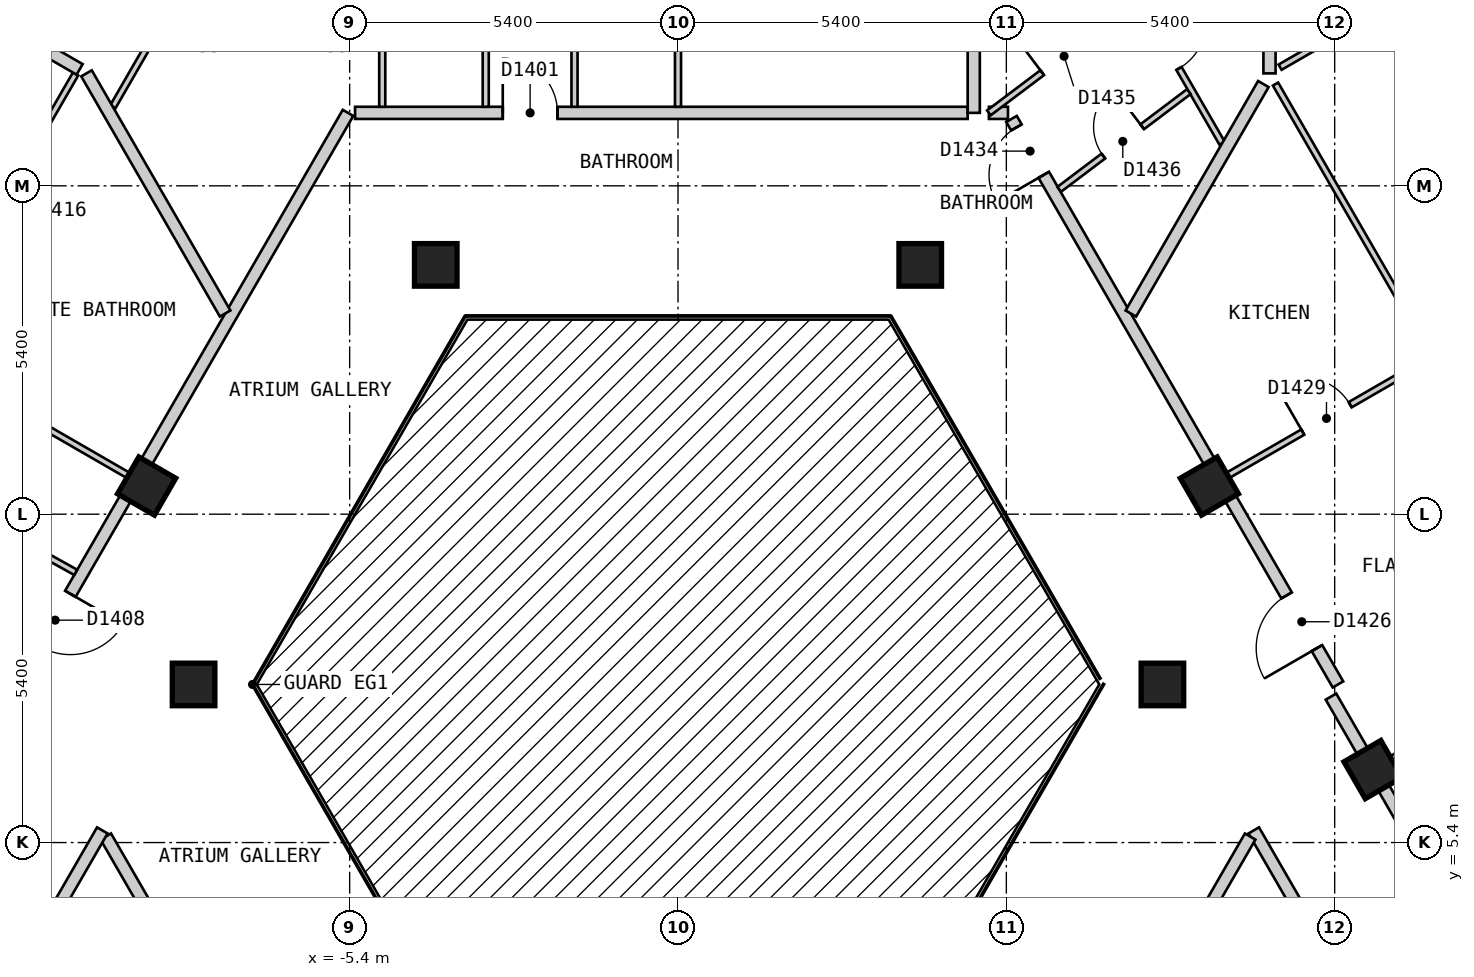
"""IFC4 building model, lengths in metres.
Left out: names, types, materials, properties, quantities, classifications, styles, units other than length and angle.
Written with IfcOpenShell. Run it as: python <this file> out.ifc"""

import sys

from ifc_helpers import new_model, si_unit, direction, frame, frame_2d, origin, origin_2d, place, context, subcontext, project, spatial, rectangle, extrude, element, fill, save


model = new_model("IFC4")
c1 = context("Model", 3, precision=1e-05, world=origin(), true_north=direction((0.0, 1.0)))
c2 = subcontext(c1, "Body", "Model", "MODEL_VIEW")
j1 = project(units=[si_unit("LENGTHUNIT", "METRE"), si_unit("PLANEANGLEUNIT", "RADIAN")], contexts=[c1])
p1 = place(None, origin())
s1 = spatial("IfcSite", under=j1, at=p1, CompositionType="ELEMENT")
p2 = place(p1, origin())
s2 = spatial("IfcBuilding", under=s1, at=p2, CompositionType="ELEMENT")
p3 = place(p2, frame((0.0, 0.0, 166.2)))
s3 = spatial("IfcBuildingStorey", under=s2, at=p3, CompositionType="ELEMENT", Elevation=166.2)
for number, where, z_axis, x_axis in (
    (1, (11.431, 6.6, 0.0), (0.0, 0.0, 1.0), (-0.5, 0.866, 0.0)),
    (2, (7.967, 8.0, 0.0), (0.0, 0.0, 1.0), (1.0, 0.0, 0.0)),
    (3, (8.739, 11.263, 0.0), (0.0, 0.0, 1.0), (-0.5, 0.866, 0.0)),
    (4, (3.984, 14.9, 0.0), (0.0, 0.0, 1.0), (1.0, 0.0, 0.0)),
    (5, (-3.984, 14.9, 0.0), (0.0, 0.0, 1.0), (1.0, 0.0, 0.0)),
    (6, (-8.739, 11.263, 0.0), (0.0, 0.0, 1.0), (-0.5, -0.866, 0.0)),
    (7, (-7.967, 8.0, 0.0), (0.0, 0.0, 1.0), (1.0, 0.0, 0.0)),
):
    element("IfcColumn", number, at=place(p3, frame(where, z_axis=z_axis, x_axis=x_axis)), inside=s3, PredefinedType="COLUMN", context=c2, shape_type="SweptSolid", body=[
        extrude(rectangle(XDim=0.7, YDim=0.7, at=origin_2d()), origin(), (0.0, 0.0, 1.0), 3.0),
    ])
p4 = place(p3, frame((-9.411, 5.5, 0.0), z_axis=(0.0, 0.0, 1.0), x_axis=(0.500018099276, -0.86601495391, 0.0)))
e8 = element("IfcWall", 8, at=p4, inside=s3, PredefinedType="PARTITIONING", context=c2, shape_type="SweptSolid", body=[
    extrude(rectangle(XDim=4.765, YDim=0.2, at=frame_2d((2.383, 0.0))), origin(), (0.0, 0.0, 1.0), 2.7),
])
p5 = place(p3, frame((9.469, 5.6, 0.0), z_axis=(0.0, 0.0, 1.0), x_axis=(0.499964524401, -0.866045884662, 0.0)))
e9 = element("IfcWall", 9, at=p5, inside=s3, PredefinedType="PARTITIONING", context=c2, shape_type="SweptSolid", body=[
    extrude(rectangle(XDim=7.042, YDim=0.2, at=frame_2d((3.521, 0.0))), origin(), (0.0, 0.0, 1.0), 2.7),
])
p6 = place(p5, frame((3.129, 0.0, 0.0)))
e10 = element("IfcOpeningElement", 10, at=p6, cuts=e9, PredefinedType="OPENING", context=c2, shape_type="SweptSolid", body=[
    extrude(rectangle(XDim=0.9, YDim=2.1, at=frame_2d((0.45, 1.05))), frame((0.0, 0.11, 0.0), z_axis=(0.0, -1.0, 0.0), x_axis=(1.0, 0.0, 0.0)), (0.0, 0.0, 1.0), 0.22),
])
p7 = place(p3, frame((10.739, 7.8, 0.0), z_axis=(0.0, 0.0, 1.0), x_axis=(0.499964311759, -0.86604600742, 0.0)))
e11 = element("IfcWall", 11, at=p7, inside=s3, PredefinedType="PARTITIONING", context=c2, shape_type="SweptSolid", body=[
    extrude(rectangle(XDim=9.583, YDim=0.2, at=frame_2d((4.792, 0.0))), origin(), (0.0, 0.0, 1.0), 2.7),
])
p8 = place(p3, frame((5.485, 17.3, 0.0), z_axis=(0.0, 0.0, 1.0), x_axis=(0.499965832213, -0.866045129667, 0.0)))
e12 = element("IfcWall", 12, at=p8, inside=s3, PredefinedType="PARTITIONING", context=c2, shape_type="SweptSolid", body=[
    extrude(rectangle(XDim=10.739, YDim=0.2, at=frame_2d((5.369, 0.0))), origin(), (0.0, 0.0, 1.0), 2.7),
])
p9 = place(p8, frame((9.048, 0.0, 0.0)))
e13 = element("IfcOpeningElement", 13, at=p9, cuts=e12, PredefinedType="OPENING", context=c2, shape_type="SweptSolid", body=[
    extrude(rectangle(XDim=1.0, YDim=2.1, at=frame_2d((0.5, 1.05))), frame((0.0, 0.11, 0.0), z_axis=(0.0, -1.0, 0.0), x_axis=(1.0, 0.0, 0.0)), (0.0, 0.0, 1.0), 0.22),
])
p10 = place(p8, frame((0.161, 0.0, 0.0)))
e14 = element("IfcOpeningElement", 14, at=p10, cuts=e12, PredefinedType="OPENING", context=c2, shape_type="SweptSolid", body=[
    extrude(rectangle(XDim=0.9, YDim=2.1, at=frame_2d((0.45, 1.05))), frame((0.0, 0.11, 0.0), z_axis=(0.0, -1.0, 0.0), x_axis=(1.0, 0.0, 0.0)), (0.0, 0.0, 1.0), 0.22),
])
p11 = place(p3, frame((-5.311, 17.4, 0.0), z_axis=(0.0, 0.0, 1.0), x_axis=(1.0, 0.0, 0.0)))
e15 = element("IfcWall", 15, at=p11, inside=s3, PredefinedType="PARTITIONING", context=c2, shape_type="SweptSolid", body=[
    extrude(rectangle(XDim=10.075, YDim=0.2, at=frame_2d((5.038, 0.0))), origin(), (0.0, 0.0, 1.0), 2.7),
])
p12 = place(p11, frame((2.429, 0.0, 0.0)))
e16 = element("IfcOpeningElement", 16, at=p12, cuts=e15, PredefinedType="OPENING", context=c2, shape_type="SweptSolid", body=[
    extrude(rectangle(XDim=0.9, YDim=2.1, at=frame_2d((0.45, 1.05))), frame((0.0, 0.11, 0.0), z_axis=(0.0, -1.0, 0.0), x_axis=(1.0, 0.0, 0.0)), (0.0, 0.0, 1.0), 0.22),
])
p13 = place(p3, frame((5.113, 17.4, 0.0), z_axis=(0.0, 0.0, 1.0), x_axis=(1.0, 0.0, 0.0)))
e17 = element("IfcWall", 17, at=p13, inside=s3, PredefinedType="PARTITIONING", context=c2, shape_type="SweptSolid", body=[
    extrude(rectangle(XDim=0.314, YDim=0.2, at=frame_2d((0.157, 0.0))), origin(), (0.0, 0.0, 1.0), 2.7),
])
p14 = place(p3, frame((7.028, 1.373, 0.0), z_axis=(0.0, 0.0, 1.0), x_axis=(0.499953126767, 0.866052464367, 0.0)))
e18 = element("IfcWall", 18, at=p14, inside=s3, PredefinedType="PARTITIONING", context=c2, shape_type="SweptSolid", body=[
    extrude(rectangle(XDim=4.764, YDim=0.2, at=frame_2d((2.382, 0.0))), origin(), (0.0, 0.0, 1.0), 2.7),
])
p15 = place(p3, frame((-13.048, -0.601, 0.0), z_axis=(0.0, 0.0, 1.0), x_axis=(0.499982180423, 0.866035691677, 0.0)))
e19 = element("IfcWall", 19, at=p15, inside=s3, PredefinedType="PARTITIONING", context=c2, shape_type="SweptSolid", body=[
    extrude(rectangle(XDim=7.16, YDim=0.2, at=frame_2d((3.58, 0.0))), origin(), (0.0, 0.0, 1.0), 2.7),
])
p16 = place(p15, frame((3.13, 0.0, 0.0)))
e20 = element("IfcOpeningElement", 20, at=p16, cuts=e19, PredefinedType="OPENING", context=c2, shape_type="SweptSolid", body=[
    extrude(rectangle(XDim=0.9, YDim=2.1, at=frame_2d((0.45, 1.05))), frame((0.0, 0.11, 0.0), z_axis=(0.0, -1.0, 0.0), x_axis=(1.0, 0.0, 0.0)), (0.0, 0.0, 1.0), 0.22),
])
p17 = place(p3, frame((-10.854, 8.0, 0.0), z_axis=(0.0, 0.0, 1.0), x_axis=(0.499997637144, 0.866026767976, 0.0)))
e21 = element("IfcWall", 21, at=p17, inside=s3, PredefinedType="PARTITIONING", context=c2, shape_type="SweptSolid", body=[
    extrude(rectangle(XDim=10.854, YDim=0.2, at=frame_2d((5.427, 0.0))), origin(), (0.0, 0.0, 1.0), 2.7),
])
p18 = place(p17, frame((0.721, 0.0, 0.0)))
e22 = element("IfcOpeningElement", 22, at=p18, cuts=e21, PredefinedType="OPENING", context=c2, shape_type="SweptSolid", body=[
    extrude(rectangle(XDim=1.0, YDim=2.1, at=frame_2d((0.5, 1.05))), frame((0.0, 0.11, 0.0), z_axis=(0.0, -1.0, 0.0), x_axis=(1.0, 0.0, 0.0)), (0.0, 0.0, 1.0), 0.22),
])
p19 = place(p3, frame((7.073, 20.15, 0.0), z_axis=(0.0, 0.0, 1.0), x_axis=(0.499917691695, -0.866072919292, 0.0)))
e23 = element("IfcWall", 23, at=p19, inside=s3, PredefinedType="PARTITIONING", context=c2, shape_type="SweptSolid", body=[
    extrude(rectangle(XDim=3.753, YDim=0.1, at=frame_2d((1.876, 0.0))), origin(), (0.0, 0.0, 1.0), 2.7),
])
p20 = place(p19, frame((1.432, 0.0, 0.0)))
e24 = element("IfcOpeningElement", 24, at=p20, cuts=e23, PredefinedType="OPENING", context=c2, shape_type="SweptSolid", body=[
    extrude(rectangle(XDim=0.9, YDim=2.1, at=frame_2d((0.45, 1.05))), frame((0.0, 0.06, 0.0), z_axis=(0.0, -1.0, 0.0), x_axis=(1.0, 0.0, 0.0)), (0.0, 0.0, 1.0), 0.12),
])
p21 = place(p3, frame((9.827, 17.874, 0.0), z_axis=(0.0, 0.0, 1.0), x_axis=(0.499962189394, -0.866047232647, 0.0)))
e25 = element("IfcWall", 25, at=p21, inside=s3, PredefinedType="PARTITIONING", context=c2, shape_type="SweptSolid", body=[
    extrude(rectangle(XDim=11.401, YDim=0.1, at=frame_2d((5.701, 0.0))), origin(), (0.0, 0.0, 1.0), 2.7),
])
p22 = place(p21, frame((7.433, 0.0, 0.0)))
e26 = element("IfcOpeningElement", 26, at=p22, cuts=e25, PredefinedType="OPENING", context=c2, shape_type="SweptSolid", body=[
    extrude(rectangle(XDim=0.9, YDim=2.1, at=frame_2d((0.45, 1.05))), frame((0.0, 0.06, 0.0), z_axis=(0.0, -1.0, 0.0), x_axis=(1.0, 0.0, 0.0)), (0.0, 0.0, 1.0), 0.12),
])
p23 = place(p3, frame((-4.864, 20.769, 0.0), z_axis=(0.0, 0.0, 1.0), x_axis=(0.0, -1.0, 0.0)))
e27 = element("IfcWall", 27, at=p23, inside=s3, PredefinedType="PARTITIONING", context=c2, shape_type="SweptSolid", body=[
    extrude(rectangle(XDim=3.269, YDim=0.1, at=frame_2d((1.635, 0.0))), origin(), (0.0, 0.0, 1.0), 2.7),
])
p24 = place(p3, frame((0.0, 20.43, 0.0), z_axis=(0.0, 0.0, 1.0), x_axis=(0.0, -1.0, 0.0)))
e28 = element("IfcWall", 28, at=p24, inside=s3, PredefinedType="PARTITIONING", context=c2, shape_type="SweptSolid", body=[
    extrude(rectangle(XDim=2.93, YDim=0.1, at=frame_2d((1.465, 0.0))), origin(), (0.0, 0.0, 1.0), 2.7),
])
p25 = place(p3, frame((-13.444, 11.814, 0.0), z_axis=(0.0, 0.0, 1.0), x_axis=(0.873653620945, -0.486548405207, 0.0)))
e29 = element("IfcWall", 29, at=p25, inside=s3, PredefinedType="PARTITIONING", context=c2, shape_type="SweptSolid", body=[
    extrude(rectangle(XDim=4.051, YDim=0.1, at=frame_2d((2.025, 0.0))), origin(), (0.0, 0.0, 1.0), 2.7),
])
p26 = place(p25, frame((1.65, 0.0, 0.0)))
e30 = element("IfcOpeningElement", 30, at=p26, cuts=e29, PredefinedType="OPENING", context=c2, shape_type="SweptSolid", body=[
    extrude(rectangle(XDim=0.8, YDim=2.1, at=frame_2d((0.4, 1.05))), frame((0.0, 0.06, 0.0), z_axis=(0.0, -1.0, 0.0), x_axis=(1.0, 0.0, 0.0)), (0.0, 0.0, 1.0), 0.12),
])
p27 = place(p3, frame((-9.295, 17.5, 0.0), z_axis=(0.0, 0.0, 1.0), x_axis=(0.500060839138, 0.865990275442, 0.0)))
e31 = element("IfcWall", 31, at=p27, inside=s3, PredefinedType="PARTITIONING", context=c2, shape_type="SweptSolid", body=[
    extrude(rectangle(XDim=3.81, YDim=0.1, at=frame_2d((1.905, 0.0))), origin(), (0.0, 0.0, 1.0), 2.7),
])
p28 = place(p27, frame((2.079, 0.0, 0.0)))
e32 = element("IfcOpeningElement", 32, at=p28, cuts=e31, PredefinedType="OPENING", context=c2, shape_type="SweptSolid", body=[
    extrude(rectangle(XDim=0.8, YDim=2.1, at=frame_2d((0.4, 1.05))), frame((0.0, 0.06, 0.0), z_axis=(0.0, -1.0, 0.0), x_axis=(1.0, 0.0, 0.0)), (0.0, 0.0, 1.0), 0.12),
])
p29 = place(p3, frame((-15.704, 8.0, 0.0), z_axis=(0.0, 0.0, 1.0), x_axis=(0.500005637941, 0.866022148693, 0.0)))
e33 = element("IfcWall", 33, at=p29, inside=s3, PredefinedType="PARTITIONING", context=c2, shape_type="SweptSolid", body=[
    extrude(rectangle(XDim=11.592, YDim=0.1, at=frame_2d((5.796, 0.0))), origin(), (0.0, 0.0, 1.0), 2.7),
])
p30 = place(p29, frame((3.132, 0.0, 0.0)))
e34 = element("IfcOpeningElement", 34, at=p30, cuts=e33, PredefinedType="OPENING", context=c2, shape_type="SweptSolid", body=[
    extrude(rectangle(XDim=0.9, YDim=2.1, at=frame_2d((0.45, 1.05))), frame((0.0, 0.06, 0.0), z_axis=(0.0, -1.0, 0.0), x_axis=(1.0, 0.0, 0.0)), (0.0, 0.0, 1.0), 0.12),
])
p31 = place(p29, frame((8.6, 0.0, 0.0)))
e35 = element("IfcOpeningElement", 35, at=p31, cuts=e33, PredefinedType="OPENING", context=c2, shape_type="SweptSolid", body=[
    extrude(rectangle(XDim=0.8, YDim=2.1, at=frame_2d((0.4, 1.05))), frame((0.0, 0.06, 0.0), z_axis=(0.0, -1.0, 0.0), x_axis=(1.0, 0.0, 0.0)), (0.0, 0.0, 1.0), 0.12),
])
p32 = place(p3, frame((-3.162, 17.5, 0.0), z_axis=(0.0, 0.0, 1.0), x_axis=(0.0, 1.0, 0.0)))
e36 = element("IfcWall", 36, at=p32, inside=s3, PredefinedType="PARTITIONING", context=c2, shape_type="SweptSolid", body=[
    extrude(rectangle(XDim=2.959, YDim=0.1, at=frame_2d((1.479, 0.0))), origin(), (0.0, 0.0, 1.0), 2.7),
])
p33 = place(p32, frame((0.98, 0.0, 0.0)))
e37 = element("IfcOpeningElement", 37, at=p33, cuts=e36, PredefinedType="OPENING", context=c2, shape_type="SweptSolid", body=[
    extrude(rectangle(XDim=0.9, YDim=2.1, at=frame_2d((0.45, 1.05))), frame((0.0, 0.06, 0.0), z_axis=(0.0, -1.0, 0.0), x_axis=(1.0, 0.0, 0.0)), (0.0, 0.0, 1.0), 0.12),
])
p34 = place(p3, frame((-1.702, 17.5, 0.0), z_axis=(0.0, 0.0, 1.0), x_axis=(0.0, 1.0, 0.0)))
e38 = element("IfcWall", 38, at=p34, inside=s3, PredefinedType="PARTITIONING", context=c2, shape_type="SweptSolid", body=[
    extrude(rectangle(XDim=2.91, YDim=0.1, at=frame_2d((1.455, 0.0))), origin(), (0.0, 0.0, 1.0), 2.7),
])
p35 = place(p34, frame((1.03, 0.0, 0.0)))
e39 = element("IfcOpeningElement", 39, at=p35, cuts=e38, PredefinedType="OPENING", context=c2, shape_type="SweptSolid", body=[
    extrude(rectangle(XDim=0.8, YDim=2.1, at=frame_2d((0.4, 1.05))), frame((0.0, 0.06, 0.0), z_axis=(0.0, -1.0, 0.0), x_axis=(1.0, 0.0, 0.0)), (0.0, 0.0, 1.0), 0.12),
])
p36 = place(p3, frame((11.518, 6.65, 0.0), z_axis=(0.0, 0.0, 1.0), x_axis=(0.865949381454, 0.500131651427, 0.0)))
e40 = element("IfcWall", 40, at=p36, inside=s3, PredefinedType="PARTITIONING", context=c2, shape_type="SweptSolid", body=[
    extrude(rectangle(XDim=4.097, YDim=0.1, at=frame_2d((2.049, 0.0))), origin(), (0.0, 0.0, 1.0), 2.7),
])
p37 = place(p36, frame((1.623, 0.0, 0.0)))
e41 = element("IfcOpeningElement", 41, at=p37, cuts=e40, PredefinedType="OPENING", context=c2, shape_type="SweptSolid", body=[
    extrude(rectangle(XDim=0.8, YDim=2.1, at=frame_2d((0.4, 1.05))), frame((0.0, 0.06, 0.0), z_axis=(0.0, -1.0, 0.0), x_axis=(1.0, 0.0, 0.0)), (0.0, 0.0, 1.0), 0.12),
])
p38 = place(p3, frame((8.999, 11.413, 0.0), z_axis=(0.0, 0.0, 1.0), x_axis=(0.865969252911, 0.500097243556, 0.0)))
e42 = element("IfcWall", 42, at=p38, inside=s3, PredefinedType="PARTITIONING", context=c2, shape_type="SweptSolid", body=[
    extrude(rectangle(XDim=3.947, YDim=0.1, at=frame_2d((1.974, 0.0))), origin(), (0.0, 0.0, 1.0), 2.7),
])
p39 = place(p38, frame((1.474, 0.0, 0.0)))
e43 = element("IfcOpeningElement", 43, at=p39, cuts=e42, PredefinedType="OPENING", context=c2, shape_type="SweptSolid", body=[
    extrude(rectangle(XDim=0.9, YDim=2.1, at=frame_2d((0.45, 1.05))), frame((0.0, 0.06, 0.0), z_axis=(0.0, -1.0, 0.0), x_axis=(1.0, 0.0, 0.0)), (0.0, 0.0, 1.0), 0.12),
])
p40 = place(p3, frame((9.902, 18.151, 0.0), z_axis=(0.0, 0.0, 1.0), x_axis=(0.866032278734, 0.499988092049, 0.0)))
e44 = element("IfcWall", 44, at=p40, inside=s3, PredefinedType="PARTITIONING", context=c2, shape_type="SweptSolid", body=[
    extrude(rectangle(XDim=5.649, YDim=0.1, at=frame_2d((2.824, 0.0))), origin(), (0.0, 0.0, 1.0), 2.7),
])
p41 = place(p40, frame((2.274, 0.0, 0.0)))
e45 = element("IfcOpeningElement", 45, at=p41, cuts=e44, PredefinedType="OPENING", context=c2, shape_type="SweptSolid", body=[
    extrude(rectangle(XDim=0.9, YDim=2.1, at=frame_2d((0.45, 1.05))), frame((0.0, 0.06, 0.0), z_axis=(0.0, -1.0, 0.0), x_axis=(1.0, 0.0, 0.0)), (0.0, 0.0, 1.0), 0.12),
])
p42 = place(p3, frame((6.269, 16.142, 0.0), z_axis=(0.0, 0.0, 1.0), x_axis=(0.798549086509, 0.601929693931, 0.0)))
e46 = element("IfcWall", 46, at=p42, inside=s3, PredefinedType="PARTITIONING", context=c2, shape_type="SweptSolid", body=[
    extrude(rectangle(XDim=2.67, YDim=0.1, at=frame_2d((1.335, 0.0))), origin(), (0.0, 0.0, 1.0), 2.7),
])
p43 = place(p42, frame((0.91, 0.0, 0.0)))
e47 = element("IfcOpeningElement", 47, at=p43, cuts=e46, PredefinedType="OPENING", context=c2, shape_type="SweptSolid", body=[
    extrude(rectangle(XDim=0.8, YDim=2.1, at=frame_2d((0.4, 1.05))), frame((0.0, 0.06, 0.0), z_axis=(0.0, -1.0, 0.0), x_axis=(1.0, 0.0, 0.0)), (0.0, 0.0, 1.0), 0.12),
])
p44 = place(p3, frame((5.113, 17.4, 0.0), z_axis=(0.0, 0.0, 1.0), x_axis=(0.798718434647, 0.601704962714, 0.0)))
e48 = element("IfcWall", 48, at=p44, inside=s3, PredefinedType="PARTITIONING", context=c2, shape_type="SweptSolid", body=[
    extrude(rectangle(XDim=3.045, YDim=0.1, at=frame_2d((1.522, 0.0))), origin(), (0.0, 0.0, 1.0), 2.7),
])
p45 = place(p44, frame((1.098, 0.0, 0.0)))
e49 = element("IfcOpeningElement", 49, at=p45, cuts=e48, PredefinedType="OPENING", context=c2, shape_type="SweptSolid", body=[
    extrude(rectangle(XDim=0.9, YDim=2.1, at=frame_2d((0.45, 1.05))), frame((0.0, 0.06, 0.0), z_axis=(0.0, -1.0, 0.0), x_axis=(1.0, 0.0, 0.0)), (0.0, 0.0, 1.0), 0.12),
])
p46 = place(p3, frame((-9.728, 18.05, 0.0), z_axis=(0.0, 0.0, 1.0), x_axis=(0.499921709333, -0.866070600204, 0.0)))
e50 = element("IfcWall", 50, at=p46, inside=s3, PredefinedType="PARTITIONING", context=c2, shape_type="SweptSolid", body=[
    extrude(rectangle(XDim=4.561, YDim=0.2, at=frame_2d((2.28, 0.0))), origin(), (0.0, 0.0, 1.0), 2.7),
])
p47 = place(p3, frame((-14.794, 20.975, 0.0), z_axis=(0.0, 0.0, 1.0), x_axis=(0.865982978614, -0.500073475352, 0.0)))
e51 = element("IfcWall", 51, at=p47, inside=s3, PredefinedType="PARTITIONING", context=c2, shape_type="SweptSolid", body=[
    extrude(rectangle(XDim=5.719, YDim=0.2, at=frame_2d((2.86, 0.0))), origin(), (0.0, 0.0, 1.0), 2.7),
])
p48 = place(p3, frame((7.448, 14.1, 0.0), z_axis=(0.0, 0.0, 1.0), x_axis=(0.500013426303, 0.866017651966, 0.0)))
e52 = element("IfcWall", 52, at=p48, inside=s3, PredefinedType="PARTITIONING", context=c2, shape_type="SweptSolid", body=[
    extrude(rectangle(XDim=4.358, YDim=0.2, at=frame_2d((2.179, 0.0))), origin(), (0.0, 0.0, 1.0), 2.7),
])
p49 = place(p3, frame((4.864, 17.4, 0.0), z_axis=(0.0, 0.0, 1.0), x_axis=(0.0, 1.0, 0.0)))
e53 = element("IfcWall", 53, at=p49, inside=s3, PredefinedType="PARTITIONING", context=c2, shape_type="SweptSolid", body=[
    extrude(rectangle(XDim=2.82, YDim=0.2, at=frame_2d((1.41, 0.0))), origin(), (0.0, 0.0, 1.0), 2.7),
])
p50 = place(p3, frame((9.728, 18.049, 0.0), z_axis=(0.0, 0.0, 1.0), x_axis=(0.0, 1.0, 0.0)))
e54 = element("IfcWall", 54, at=p50, inside=s3, PredefinedType="PARTITIONING", context=c2, shape_type="SweptSolid", body=[
    extrude(rectangle(XDim=5.851, YDim=0.2, at=frame_2d((2.925, 0.0))), origin(), (0.0, 0.0, 1.0), 2.7),
])
p51 = place(p3, frame((-12.55, 13.463, 0.0), z_axis=(0.0, 0.0, 1.0), x_axis=(0.86606561423, -0.499930346997, 0.0)))
e55 = element("IfcWall", 55, at=p51, inside=s3, PredefinedType="PARTITIONING", context=c2, shape_type="SweptSolid", body=[
    extrude(rectangle(XDim=4.1, YDim=0.1, at=frame_2d((2.05, 0.0))), origin(), (0.0, 0.0, 1.0), 2.7),
])
p52 = place(p12, origin())
e56 = element("IfcDoor", 56, at=p52, inside=s3, OperationType="SINGLE_SWING_LEFT", PredefinedType="DOOR", context=c2, shape_type="SweptSolid", body=[
    extrude(rectangle(XDim=0.9, YDim=2.1, at=frame_2d((0.45, 1.05))), frame((0.0, 0.025, 0.0), z_axis=(0.0, -1.0, 0.0), x_axis=(1.0, 0.0, 0.0)), (0.0, 0.0, 1.0), 0.05),
])
fill(e16, e56)
p53 = place(p18, origin())
e57 = element("IfcDoor", 57, at=p53, inside=s3, OperationType="SINGLE_SWING_RIGHT", PredefinedType="DOOR", context=c2, shape_type="SweptSolid", body=[
    extrude(rectangle(XDim=1.0, YDim=2.1, at=frame_2d((0.5, 1.05))), frame((0.0, 0.025, 0.0), z_axis=(0.0, -1.0, 0.0), x_axis=(1.0, 0.0, 0.0)), (0.0, 0.0, 1.0), 0.05),
])
fill(e22, e57)
p54 = place(p9, origin())
e58 = element("IfcDoor", 58, at=p54, inside=s3, OperationType="SINGLE_SWING_RIGHT", PredefinedType="DOOR", context=c2, shape_type="SweptSolid", body=[
    extrude(rectangle(XDim=1.0, YDim=2.1, at=frame_2d((0.5, 1.05))), frame((0.0, 0.025, 0.0), z_axis=(0.0, -1.0, 0.0), x_axis=(1.0, 0.0, 0.0)), (0.0, 0.0, 1.0), 0.05),
])
fill(e13, e58)
p55 = place(p39, origin())
e59 = element("IfcDoor", 59, at=p55, inside=s3, OperationType="SINGLE_SWING_LEFT", PredefinedType="DOOR", context=c2, shape_type="SweptSolid", body=[
    extrude(rectangle(XDim=0.9, YDim=2.1, at=frame_2d((0.45, 1.05))), frame((0.0, 0.025, 0.0), z_axis=(0.0, -1.0, 0.0), x_axis=(1.0, 0.0, 0.0)), (0.0, 0.0, 1.0), 0.05),
])
fill(e43, e59)
p56 = place(p10, origin())
e60 = element("IfcDoor", 60, at=p56, inside=s3, OperationType="SINGLE_SWING_RIGHT", PredefinedType="DOOR", context=c2, shape_type="SweptSolid", body=[
    extrude(rectangle(XDim=0.9, YDim=2.1, at=frame_2d((0.45, 1.05))), frame((0.0, 0.025, 0.0), z_axis=(0.0, -1.0, 0.0), x_axis=(1.0, 0.0, 0.0)), (0.0, 0.0, 1.0), 0.05),
])
fill(e14, e60)
p57 = place(p45, origin())
e61 = element("IfcDoor", 61, at=p57, inside=s3, OperationType="SINGLE_SWING_LEFT", PredefinedType="DOOR", context=c2, shape_type="SweptSolid", body=[
    extrude(rectangle(XDim=0.9, YDim=2.1, at=frame_2d((0.45, 1.05))), frame((0.0, 0.025, 0.0), z_axis=(0.0, -1.0, 0.0), x_axis=(1.0, 0.0, 0.0)), (0.0, 0.0, 1.0), 0.05),
])
fill(e49, e61)
p58 = place(p43, origin())
e62 = element("IfcDoor", 62, at=p58, inside=s3, OperationType="SINGLE_SWING_RIGHT", PredefinedType="DOOR", context=c2, shape_type="SweptSolid", body=[
    extrude(rectangle(XDim=0.8, YDim=2.1, at=frame_2d((0.4, 1.05))), frame((0.0, 0.025, 0.0), z_axis=(0.0, -1.0, 0.0), x_axis=(1.0, 0.0, 0.0)), (0.0, 0.0, 1.0), 0.05),
])
fill(e47, e62)
p59 = place(p20, origin())
e63 = element("IfcDoor", 63, at=p59, inside=s3, OperationType="SINGLE_SWING_LEFT", PredefinedType="DOOR", context=c2, shape_type="SweptSolid", body=[
    extrude(rectangle(XDim=0.9, YDim=2.1, at=frame_2d((0.45, 1.05))), frame((0.0, 0.025, 0.0), z_axis=(0.0, -1.0, 0.0), x_axis=(1.0, 0.0, 0.0)), (0.0, 0.0, 1.0), 0.05),
])
fill(e24, e63)
save(model, sys.argv[1])
